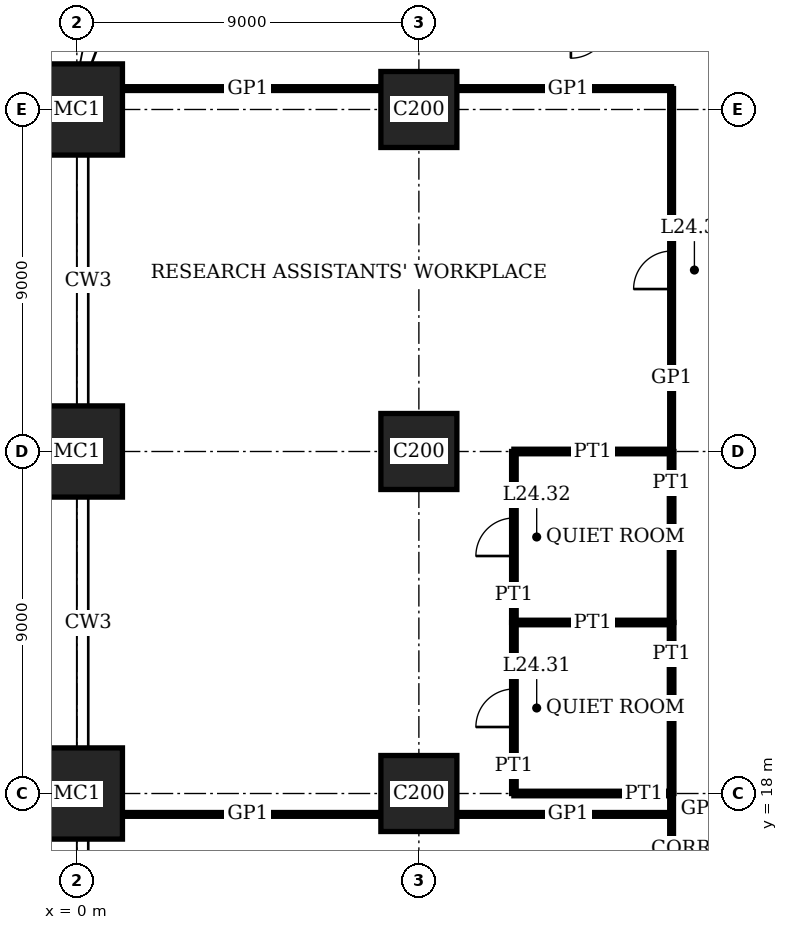
"""IFC4 building model, lengths in metres.
Left out: names, types, materials, properties, quantities, classifications, styles, units other than length and angle.
Written with IfcOpenShell. Run it as: python <this file> out.ifc"""

import sys

from ifc_helpers import new_model, si_unit, direction, frame, frame_2d, origin, origin_2d, place, context, subcontext, project, spatial, rectangle, extrude, element, fill, save


model = new_model("IFC4")
c1 = context("Model", 3, precision=1e-05, world=origin(), true_north=direction((0.0, 1.0)))
c2 = subcontext(c1, "Body", "Model", "MODEL_VIEW")
j1 = project(units=[si_unit("LENGTHUNIT", "METRE"), si_unit("PLANEANGLEUNIT", "RADIAN")], contexts=[c1])
p1 = place(None, origin())
s1 = spatial("IfcSite", under=j1, at=p1, CompositionType="ELEMENT")
p2 = place(p1, origin())
s2 = spatial("IfcBuilding", under=s1, at=p2, CompositionType="ELEMENT")
p3 = place(p2, frame((0.0, 0.0, 101.0)))
s3 = spatial("IfcBuildingStorey", under=s2, at=p3, CompositionType="ELEMENT", Elevation=101.0)
for number, where, z_axis, x_axis in (
    (1, (0.0, 18.0, 0.0), (0.0, 0.0, 1.0), (1.0, 0.0, 0.0)),
    (2, (0.0, 27.0, 0.0), (0.0, 0.0, 1.0), (1.0, 0.0, 0.0)),
    (3, (0.0, 36.0, 0.0), (0.0, 0.0, 1.0), (1.0, 0.0, 0.0)),
):
    element("IfcColumn", number, at=place(p3, frame(where, z_axis=z_axis, x_axis=x_axis)), inside=s3, PredefinedType="COLUMN", context=c2, shape_type="SweptSolid", body=[
        extrude(rectangle(XDim=2.4, YDim=2.4, at=origin_2d()), origin(), (0.0, 0.0, 1.0), 4.0),
    ])
for number, where, z_axis, x_axis in (
    (4, (9.0, 18.0, 0.0), (0.0, 0.0, 1.0), (1.0, 0.0, 0.0)),
    (5, (9.0, 27.0, 0.0), (0.0, 0.0, 1.0), (1.0, 0.0, 0.0)),
    (6, (9.0, 36.0, 0.0), (0.0, 0.0, 1.0), (1.0, 0.0, 0.0)),
):
    element("IfcColumn", number, at=place(p3, frame(where, z_axis=z_axis, x_axis=x_axis)), inside=s3, PredefinedType="COLUMN", context=c2, shape_type="SweptSolid", body=[
        extrude(rectangle(XDim=2.0, YDim=2.0, at=origin_2d()), origin(), (0.0, 0.0, 1.0), 4.0),
    ])
p4 = place(p3, frame((1.2, 17.45, 0.0), z_axis=(0.0, 0.0, 1.0), x_axis=(1.0, 0.0, 0.0)))
e7 = element("IfcWall", 7, at=p4, inside=s3, PredefinedType="PARTITIONING", context=c2, shape_type="SweptSolid", body=[
    extrude(rectangle(XDim=6.8, YDim=0.1, at=frame_2d((3.4, 0.0))), origin(), (0.0, 0.0, 1.0), 3.75),
])
p5 = place(p3, frame((10.0, 17.45, 0.0), z_axis=(0.0, 0.0, 1.0), x_axis=(1.0, 0.0, 0.0)))
e8 = element("IfcWall", 8, at=p5, inside=s3, PredefinedType="PARTITIONING", context=c2, shape_type="SweptSolid", body=[
    extrude(rectangle(XDim=5.65, YDim=0.1, at=frame_2d((2.825, 0.0))), origin(), (0.0, 0.0, 1.0), 3.75),
])
p6 = place(p3, frame((11.5, 18.0, 0.0), z_axis=(0.0, 0.0, 1.0), x_axis=(1.0, 0.0, 0.0)))
e9 = element("IfcWall", 9, at=p6, inside=s3, PredefinedType="PARTITIONING", context=c2, shape_type="SweptSolid", body=[
    extrude(rectangle(XDim=4.15, YDim=0.12, at=frame_2d((2.075, 0.0))), origin(), (0.0, 0.0, 1.0), 3.05),
])
p7 = place(p3, frame((11.5, 22.5, 0.0), z_axis=(0.0, 0.0, 1.0), x_axis=(1.0, 0.0, 0.0)))
e10 = element("IfcWall", 10, at=p7, inside=s3, PredefinedType="PARTITIONING", context=c2, shape_type="SweptSolid", body=[
    extrude(rectangle(XDim=4.15, YDim=0.12, at=frame_2d((2.075, 0.0))), origin(), (0.0, 0.0, 1.0), 3.1),
])
p8 = place(p3, frame((11.5, 27.0, 0.0), z_axis=(0.0, 0.0, 1.0), x_axis=(1.0, 0.0, 0.0)))
e11 = element("IfcWall", 11, at=p8, inside=s3, PredefinedType="PARTITIONING", context=c2, shape_type="SweptSolid", body=[
    extrude(rectangle(XDim=4.15, YDim=0.12, at=frame_2d((2.075, 0.0))), origin(), (0.0, 0.0, 1.0), 3.05),
])
p9 = place(p3, frame((1.2, 36.55, 0.0), z_axis=(0.0, 0.0, 1.0), x_axis=(1.0, 0.0, 0.0)))
e12 = element("IfcWall", 12, at=p9, inside=s3, PredefinedType="PARTITIONING", context=c2, shape_type="SweptSolid", body=[
    extrude(rectangle(XDim=6.8, YDim=0.1, at=frame_2d((3.4, 0.0))), origin(), (0.0, 0.0, 1.0), 3.75),
])
p10 = place(p3, frame((10.0, 36.55, 0.0), z_axis=(0.0, 0.0, 1.0), x_axis=(1.0, 0.0, 0.0)))
e13 = element("IfcWall", 13, at=p10, inside=s3, PredefinedType="PARTITIONING", context=c2, shape_type="SweptSolid", body=[
    extrude(rectangle(XDim=5.65, YDim=0.1, at=frame_2d((2.825, 0.0))), origin(), (0.0, 0.0, 1.0), 3.75),
])
p11 = place(p3, frame((11.5, 18.0, 0.0), z_axis=(0.0, 0.0, 1.0), x_axis=(0.0, 1.0, 0.0)))
e14 = element("IfcWall", 14, at=p11, inside=s3, PredefinedType="PARTITIONING", context=c2, shape_type="SweptSolid", body=[
    extrude(rectangle(XDim=4.5, YDim=0.12, at=frame_2d((2.25, 0.0))), origin(), (0.0, 0.0, 1.0), 3.75),
])
p12 = place(p11, frame((1.75, 0.0, 0.0)))
e15 = element("IfcOpeningElement", 15, at=p12, cuts=e14, PredefinedType="OPENING", context=c2, shape_type="SweptSolid", body=[
    extrude(rectangle(XDim=1.0, YDim=2.4, at=frame_2d((0.5, 1.2))), frame((0.0, 0.07, 0.0), z_axis=(0.0, -1.0, 0.0), x_axis=(1.0, 0.0, 0.0)), (0.0, 0.0, 1.0), 0.14),
])
p13 = place(p3, frame((11.5, 22.5, 0.0), z_axis=(0.0, 0.0, 1.0), x_axis=(0.0, 1.0, 0.0)))
e16 = element("IfcWall", 16, at=p13, inside=s3, PredefinedType="PARTITIONING", context=c2, shape_type="SweptSolid", body=[
    extrude(rectangle(XDim=4.5, YDim=0.12, at=frame_2d((2.25, 0.0))), origin(), (0.0, 0.0, 1.0), 3.75),
])
p14 = place(p13, frame((1.75, 0.0, 0.0)))
e17 = element("IfcOpeningElement", 17, at=p14, cuts=e16, PredefinedType="OPENING", context=c2, shape_type="SweptSolid", body=[
    extrude(rectangle(XDim=1.0, YDim=2.4, at=frame_2d((0.5, 1.2))), frame((0.0, 0.07, 0.0), z_axis=(0.0, -1.0, 0.0), x_axis=(1.0, 0.0, 0.0)), (0.0, 0.0, 1.0), 0.14),
])
for number, where, z_axis, x_axis in (
    (18, (15.65, 18.0, 0.0), (0.0, 0.0, 1.0), (0.0, 1.0, 0.0)),
    (19, (15.65, 22.5, 0.0), (0.0, 0.0, 1.0), (0.0, 1.0, 0.0)),
):
    element("IfcWall", number, at=place(p3, frame(where, z_axis=z_axis, x_axis=x_axis)), inside=s3, PredefinedType="PARTITIONING", context=c2, shape_type="SweptSolid", body=[
        extrude(rectangle(XDim=4.5, YDim=0.12, at=frame_2d((2.25, 0.0))), origin(), (0.0, 0.0, 1.0), 3.75),
    ])
p15 = place(p3, frame((15.65, 15.65, 0.0), z_axis=(0.0, 0.0, 1.0), x_axis=(0.0, 1.0, 0.0)))
e20 = element("IfcWall", 20, at=p15, inside=s3, PredefinedType="PARTITIONING", context=c2, shape_type="SweptSolid", body=[
    extrude(rectangle(XDim=2.35, YDim=0.1, at=frame_2d((1.175, 0.0))), origin(), (0.0, 0.0, 1.0), 3.75),
])
p16 = place(p3, frame((15.65, 27.0, 0.0), z_axis=(0.0, 0.0, 1.0), x_axis=(0.0, 1.0, 0.0)))
e21 = element("IfcWall", 21, at=p16, inside=s3, PredefinedType="PARTITIONING", context=c2, shape_type="SweptSolid", body=[
    extrude(rectangle(XDim=9.55, YDim=0.1, at=frame_2d((4.775, 0.0))), origin(), (0.0, 0.0, 1.0), 3.75),
])
p17 = place(p16, frame((4.275, 0.0, 0.0)))
e22 = element("IfcOpeningElement", 22, at=p17, cuts=e21, PredefinedType="OPENING", context=c2, shape_type="SweptSolid", body=[
    extrude(rectangle(XDim=1.0, YDim=2.4, at=frame_2d((0.5, 1.2))), frame((0.0, 0.06, 0.0), z_axis=(0.0, -1.0, 0.0), x_axis=(1.0, 0.0, 0.0)), (0.0, 0.0, 1.0), 0.12),
])
p18 = place(p12, origin())
e23 = element("IfcDoor", 23, at=p18, inside=s3, OperationType="SINGLE_SWING_RIGHT", PredefinedType="DOOR", context=c2, shape_type="SweptSolid", body=[
    extrude(rectangle(XDim=1.0, YDim=2.4, at=frame_2d((0.5, 1.2))), frame((0.0, 0.025, 0.0), z_axis=(0.0, -1.0, 0.0), x_axis=(1.0, 0.0, 0.0)), (0.0, 0.0, 1.0), 0.05),
])
fill(e15, e23)
p19 = place(p14, origin())
e24 = element("IfcDoor", 24, at=p19, inside=s3, OperationType="SINGLE_SWING_RIGHT", PredefinedType="DOOR", context=c2, shape_type="SweptSolid", body=[
    extrude(rectangle(XDim=1.0, YDim=2.4, at=frame_2d((0.5, 1.2))), frame((0.0, 0.025, 0.0), z_axis=(0.0, -1.0, 0.0), x_axis=(1.0, 0.0, 0.0)), (0.0, 0.0, 1.0), 0.05),
])
fill(e17, e24)
p20 = place(p17, origin())
e25 = element("IfcDoor", 25, at=p20, inside=s3, OperationType="SINGLE_SWING_RIGHT", PredefinedType="DOOR", context=c2, shape_type="SweptSolid", body=[
    extrude(rectangle(XDim=1.0, YDim=2.4, at=frame_2d((0.5, 1.2))), frame((0.0, 0.02, 0.0), z_axis=(0.0, -1.0, 0.0), x_axis=(1.0, 0.0, 0.0)), (0.0, 0.0, 1.0), 0.04),
])
fill(e22, e25)
save(model, sys.argv[1])
